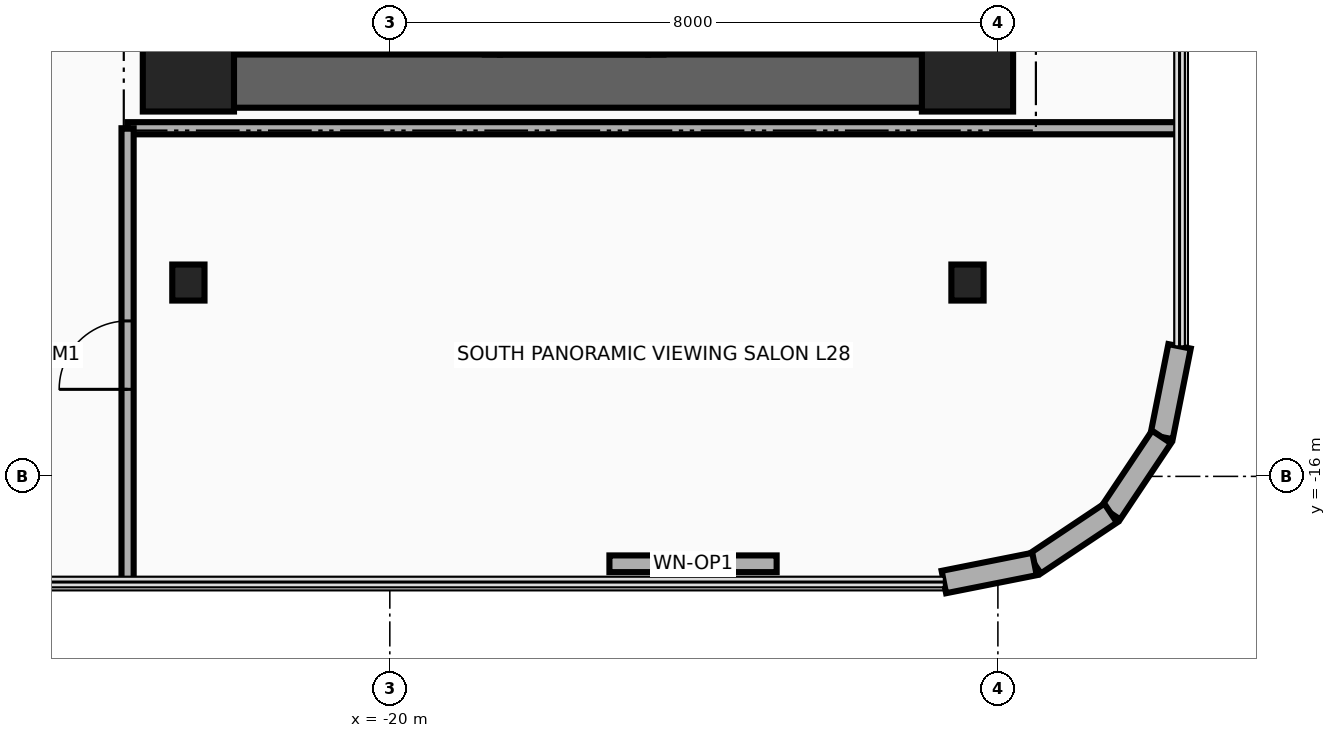
"""IFC4 building model, lengths in metres.
Left out: names, types, materials, properties, quantities, classifications, styles, units other than length and angle.
Written with IfcOpenShell. Run it as: python <this file> out.ifc"""

import sys

from ifc_helpers import new_model, si_unit, direction, frame, frame_2d, origin, origin_2d, place, context, subcontext, project, spatial, rectangle, i_section, extrude, source, transform, mapped, element, fill, save


model = new_model("IFC4")
c1 = context("Model", 3, precision=1e-05, world=origin(), true_north=direction((0.0, 1.0)))
c2 = subcontext(c1, "Body", "Model", "MODEL_VIEW")
j1 = project(units=[si_unit("LENGTHUNIT", "METRE"), si_unit("PLANEANGLEUNIT", "RADIAN")], contexts=[c1])
p1 = place(None, origin())
s1 = spatial("IfcSite", under=j1, at=p1, CompositionType="ELEMENT")
p2 = place(p1, origin())
s2 = spatial("IfcBuilding", under=s1, at=p2, CompositionType="ELEMENT")
p3 = place(p2, frame((0.0, 0.0, 113.1)))
s3 = spatial("IfcBuildingStorey", under=s2, at=p3, CompositionType="ELEMENT", Elevation=113.1)
for number, where, z_axis, x_axis in (
    (1, (-22.16, -10.45, 0.0), (0.0, 0.0, 1.0), (0.0, 1.0, 0.0)),
    (2, (-18.83, -10.45, 0.0), (0.0, 0.0, 1.0), (0.0, 1.0, 0.0)),
):
    element("IfcWall", number, at=place(p3, frame(where, z_axis=z_axis, x_axis=x_axis)), inside=s3, PredefinedType="SHEAR", context=c2, shape_type="SweptSolid", body=[
        extrude(rectangle(XDim=8.67, YDim=0.22, at=frame_2d((4.335, 0.0))), origin(), (0.0, 0.0, 1.0), 3.46),
    ])
p4 = place(p3, frame((-22.65, -11.15, 0.0), z_axis=(0.0, 0.0, 1.0), x_axis=(0.0, 1.0, 0.0)))
e3 = element("IfcWall", 3, at=p4, inside=s3, PredefinedType="SHEAR", context=c2, shape_type="SweptSolid", body=[
    extrude(rectangle(XDim=22.3, YDim=0.7, at=frame_2d((11.15, 0.0))), origin(), (0.0, 0.0, 1.0), 3.46),
])
p5 = place(p3, frame((-22.65, -10.8, 0.0), z_axis=(0.0, 0.0, 1.0), x_axis=(1.0, 0.0, 0.0)))
e4 = element("IfcWall", 4, at=p5, inside=s3, PredefinedType="SHEAR", context=c2, shape_type="SweptSolid", body=[
    extrude(rectangle(XDim=10.25, YDim=0.7, at=frame_2d((5.125, 0.0))), origin(), (0.0, 0.0, 1.0), 3.46),
])
m1 = source(origin(), c2, "Body", "SweptSolid", [
    extrude(rectangle(XDim=1.2, YDim=1.2, at=origin_2d()), origin(), (0.0, 0.0, 1.0), 3.7),
])
for number, where, z_axis, x_axis in (
    (5, (-22.65, -10.6, 0.0), (0.0, 0.0, 1.0), (1.0, 0.0, 0.0)),
    (6, (-12.4, -10.6, 0.0), (0.0, 0.0, 1.0), (1.0, 0.0, 0.0)),
):
    element("IfcColumn", number, at=place(p3, frame(where, z_axis=z_axis, x_axis=x_axis)), inside=s3, PredefinedType="COLUMN", context=c2, shape_type="MappedRepresentation", body=[
        mapped(m1, transform((0.0, 0.0, 0.0), x_axis=(1.0, 0.0, 0.0), y_axis=(0.0, 1.0, 0.0), z_axis=(0.0, 0.0, 1.0), scale=1.0)),
    ])
m2 = source(origin(), c2, "Body", "SweptSolid", [
    extrude(i_section(OverallWidth=0.424, OverallDepth=0.474, WebThickness=0.048, FlangeThickness=0.077, at=origin_2d()), origin(), (0.0, 0.0, 1.0), 3.7),
])
for number, where, z_axis, x_axis in (
    (7, (-22.65, -13.45, 0.0), (0.0, 0.0, 1.0), (1.0, 0.0, 0.0)),
    (8, (-12.4, -13.45, 0.0), (0.0, 0.0, 1.0), (1.0, 0.0, 0.0)),
):
    element("IfcColumn", number, at=place(p3, frame(where, z_axis=z_axis, x_axis=x_axis)), inside=s3, PredefinedType="COLUMN", context=c2, shape_type="MappedRepresentation", body=[
        mapped(m2, transform((0.0, 0.0, 0.0), x_axis=(1.0, 0.0, 0.0), y_axis=(0.0, 1.0, 0.0), z_axis=(0.0, 0.0, 1.0), scale=1.0)),
    ])
p6 = place(p3, frame((-9.61, -14.289, 0.0), z_axis=(0.0, 0.0, 1.0), x_axis=(-0.194996050505, -0.980804027463, 0.0)))
e9 = element("IfcWall", 9, at=p6, inside=s3, PredefinedType="SOLIDWALL", context=c2, shape_type="SweptSolid", body=[
    extrude(rectangle(XDim=1.216, YDim=0.3, at=frame_2d((0.608, 0.0))), origin(), (0.0, 0.0, 1.0), 3.46),
])
for number, where, z_axis, x_axis in (
    (10, (-9.847, -15.482, 0.0), (0.0, 0.0, 1.0), (-0.556, -0.831, 0.0)),
    (11, (-10.517, -16.483, 0.0), (0.0, 0.0, 1.0), (-0.831, -0.556, 0.0)),
):
    element("IfcWall", number, at=place(p3, frame(where, z_axis=z_axis, x_axis=x_axis)), inside=s3, PredefinedType="SOLIDWALL", context=c2, shape_type="SweptSolid", body=[
        extrude(rectangle(XDim=1.205, YDim=0.3, at=frame_2d((0.603, 0.0))), origin(), (0.0, 0.0, 1.0), 3.46),
    ])
p7 = place(p3, frame((-11.518, -17.153, 0.0), z_axis=(0.0, 0.0, 1.0), x_axis=(-0.980804027463, -0.194996050505, 0.0)))
e12 = element("IfcWall", 12, at=p7, inside=s3, PredefinedType="SOLIDWALL", context=c2, shape_type="SweptSolid", body=[
    extrude(rectangle(XDim=1.216, YDim=0.3, at=frame_2d((0.608, 0.0))), origin(), (0.0, 0.0, 1.0), 3.46),
])
p8 = place(p3, frame((-14.911, -17.15, 0.0), z_axis=(0.0, 0.0, 1.0), x_axis=(-1.0, 0.0, 0.0)))
e13 = element("IfcWall", 13, at=p8, inside=s3, PredefinedType="SOLIDWALL", context=c2, shape_type="SweptSolid", body=[
    extrude(rectangle(XDim=2.2, YDim=0.22, at=frame_2d((1.1, 0.0))), origin(), (0.0, 0.0, 1.0), 3.46),
])
p9 = place(p8, frame((0.65, 0.0, 0.95)))
e14 = element("IfcOpeningElement", 14, at=p9, cuts=e13, PredefinedType="OPENING", context=c2, shape_type="SweptSolid", body=[
    extrude(rectangle(XDim=0.9, YDim=1.3, at=frame_2d((0.45, 0.65))), frame((0.0, 0.125, 0.0), z_axis=(0.0, -1.0, 0.0), x_axis=(1.0, 0.0, 0.0)), (0.0, 0.0, 1.0), 0.25),
])
for number, where, z_axis, x_axis in (
    (15, (-18.65, -10.45, 0.0), (0.0, 0.0, 1.0), (0.0, 1.0, 0.0)),
    (16, (-16.5, -10.45, 0.0), (0.0, 0.0, 1.0), (0.0, 1.0, 0.0)),
):
    element("IfcWall", number, at=place(p3, frame(where, z_axis=z_axis, x_axis=x_axis)), inside=s3, PredefinedType="MOVABLE", context=c2, shape_type="SweptSolid", body=[
        extrude(rectangle(XDim=2.35, YDim=0.2, at=frame_2d((1.175, 0.0))), origin(), (0.0, 0.0, 1.0), 2.666),
    ])
p10 = place(p3, frame((-18.55, -10.35, 0.0), z_axis=(0.0, 0.0, 1.0), x_axis=(1.0, 0.0, 0.0)))
e17 = element("IfcWall", 17, at=p10, inside=s3, PredefinedType="MOVABLE", context=c2, shape_type="SweptSolid", body=[
    extrude(rectangle(XDim=1.95, YDim=0.2, at=frame_2d((0.975, 0.0))), origin(), (0.0, 0.0, 1.0), 2.666),
])
p11 = place(p3, frame((-23.45, -11.42, 0.0), z_axis=(0.0, 0.0, 1.0), x_axis=(1.0, 0.0, 0.0)))
e18 = element("IfcWall", 18, at=p11, inside=s3, PredefinedType="PARTITIONING", context=c2, shape_type="SweptSolid", body=[
    extrude(rectangle(XDim=13.84, YDim=0.16, at=frame_2d((6.92, 0.0))), origin(), (0.0, 0.0, 1.0), 2.834),
])
p12 = place(p3, frame((-23.45, -17.39, 0.0), z_axis=(0.0, 0.0, 1.0), x_axis=(0.0, 1.0, 0.0)))
e19 = element("IfcWall", 19, at=p12, inside=s3, PredefinedType="PARTITIONING", context=c2, shape_type="SweptSolid", body=[
    extrude(rectangle(XDim=5.97, YDim=0.16, at=frame_2d((2.985, 0.0))), origin(), (0.0, 0.0, 1.0), 3.46),
])
p13 = place(p12, frame((2.535, 0.0, 0.0)))
e20 = element("IfcOpeningElement", 20, at=p13, cuts=e19, PredefinedType="OPENING", context=c2, shape_type="SweptSolid", body=[
    extrude(rectangle(XDim=0.9, YDim=2.1, at=frame_2d((0.45, 1.05))), frame((0.0, 0.095, 0.0), z_axis=(0.0, -1.0, 0.0), x_axis=(1.0, 0.0, 0.0)), (0.0, 0.0, 1.0), 0.19),
])
p14 = place(p9, origin())
e21 = element("IfcWindow", 21, at=p14, inside=s3, PartitioningType="SINGLE_PANEL", PredefinedType="WINDOW", context=c2, shape_type="SweptSolid", body=[
    extrude(rectangle(XDim=0.9, YDim=1.3, at=frame_2d((0.45, 0.65))), frame((0.0, 0.03, 0.0), z_axis=(0.0, -1.0, 0.0), x_axis=(1.0, 0.0, 0.0)), (0.0, 0.0, 1.0), 0.06),
])
fill(e14, e21)
p15 = place(p13, origin())
e22 = element("IfcDoor", 22, at=p15, inside=s3, OperationType="SINGLE_SWING_RIGHT", PredefinedType="DOOR", context=c2, shape_type="SweptSolid", body=[
    extrude(rectangle(XDim=0.9, YDim=2.1, at=frame_2d((0.45, 1.05))), frame((0.0, 0.025, 0.0), z_axis=(0.0, -1.0, 0.0), x_axis=(1.0, 0.0, 0.0)), (0.0, 0.0, 1.0), 0.05),
])
fill(e20, e22)
save(model, sys.argv[1])
